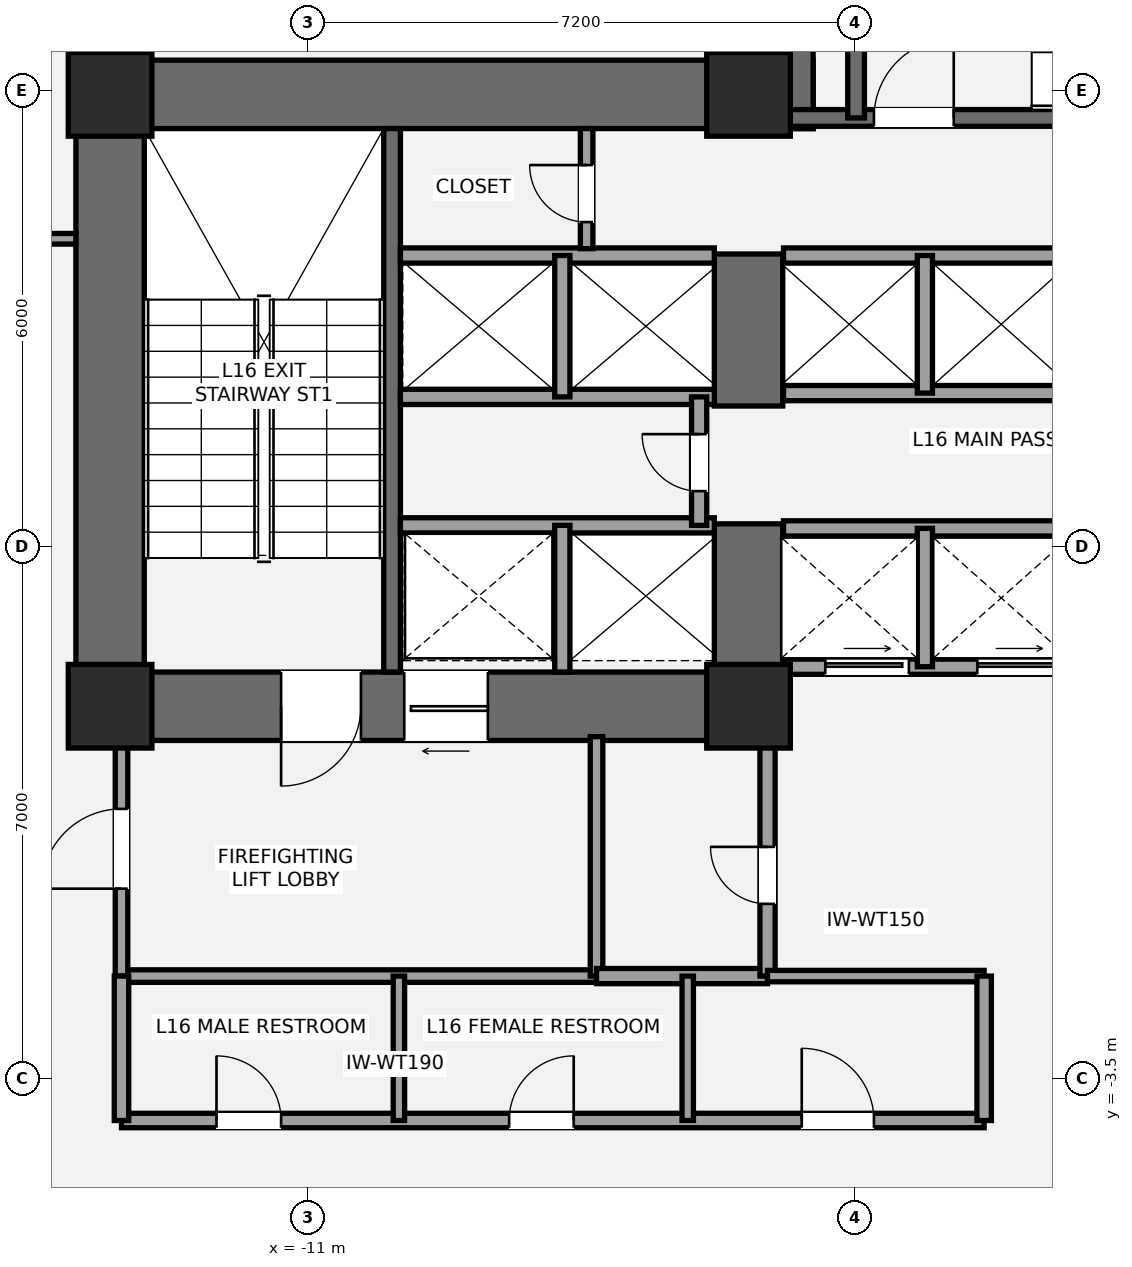
"""IFC4 building model, lengths in metres.
Left out: names, types, materials, properties, quantities, classifications, styles, units other than length and angle.
Written with IfcOpenShell. Run it as: python <this file> out.ifc"""

import sys

from ifc_helpers import new_model, si_unit, direction, frame, frame_2d, origin, origin_2d, place, context, subcontext, project, spatial, rectangle, extrude, element, fill, save


model = new_model("IFC4")
c1 = context("Model", 3, precision=1e-05, world=origin(), true_north=direction((0.0, 1.0)))
c2 = subcontext(c1, "Body", "Model", "MODEL_VIEW")
j1 = project(units=[si_unit("LENGTHUNIT", "METRE"), si_unit("PLANEANGLEUNIT", "RADIAN")], contexts=[c1])
p1 = place(None, origin())
s1 = spatial("IfcSite", under=j1, at=p1, CompositionType="ELEMENT")
p2 = place(p1, origin())
s2 = spatial("IfcBuilding", under=s1, at=p2, CompositionType="ELEMENT")
p3 = place(p2, frame((0.0, 0.0, 63.0)))
s3 = spatial("IfcBuildingStorey", under=s2, at=p3, CompositionType="ELEMENT", Elevation=63.0)
p4 = place(p3, frame((-13.6, 0.95, 0.0), z_axis=(0.0, 0.0, 1.0), x_axis=(0.0, 1.0, 0.0)))
e1 = element("IfcWall", 1, at=p4, inside=s3, PredefinedType="SHEAR", context=c2, shape_type="SweptSolid", body=[
    extrude(rectangle(XDim=8.95, YDim=0.9, at=frame_2d((4.475, 0.0))), origin(), (0.0, 0.0, 1.0), 3.6),
])
p5 = place(p3, frame((-14.05, 9.45, 0.0), z_axis=(0.0, 0.0, 1.0), x_axis=(1.0, 0.0, 0.0)))
e2 = element("IfcWall", 2, at=p5, inside=s3, PredefinedType="SHEAR", context=c2, shape_type="SweptSolid", body=[
    extrude(rectangle(XDim=9.7, YDim=0.9, at=frame_2d((4.85, 0.0))), origin(), (0.0, 0.0, 1.0), 3.6),
])
p6 = place(p3, frame((-4.75, 1.4, 0.0), z_axis=(0.0, 0.0, 1.0), x_axis=(-1.0, 0.0, 0.0)))
e3 = element("IfcWall", 3, at=p6, inside=s3, PredefinedType="SHEAR", context=c2, shape_type="SweptSolid", body=[
    extrude(rectangle(XDim=9.3, YDim=0.9, at=frame_2d((4.65, 0.0))), origin(), (0.0, 0.0, 1.0), 3.6),
])
p7 = place(p6, frame((5.55, 0.0, 0.0)))
e4 = element("IfcOpeningElement", 4, at=p7, cuts=e3, PredefinedType="OPENING", context=c2, shape_type="SweptSolid", body=[
    extrude(rectangle(XDim=1.05, YDim=2.15, at=frame_2d((0.525, 1.075))), frame((0.0, 0.46, 0.0), z_axis=(0.0, -1.0, 0.0), x_axis=(1.0, 0.0, 0.0)), (0.0, 0.0, 1.0), 0.92),
])
p8 = place(p6, frame((3.88, 0.0, 0.0)))
e5 = element("IfcOpeningElement", 5, at=p8, cuts=e3, PredefinedType="OPENING", context=c2, shape_type="SweptSolid", body=[
    extrude(rectangle(XDim=1.1, YDim=2.2, at=frame_2d((0.55, 1.1))), frame((0.0, 0.46, 0.0), z_axis=(0.0, -1.0, 0.0), x_axis=(1.0, 0.0, 0.0)), (0.0, 0.0, 1.0), 0.92),
])
p9 = place(p3, frame((-5.2, 0.95, 0.0), z_axis=(0.0, 0.0, 1.0), x_axis=(0.0, 1.0, 0.0)))
e6 = element("IfcWall", 6, at=p9, inside=s3, PredefinedType="SHEAR", context=c2, shape_type="SweptSolid", body=[
    extrude(rectangle(XDim=2.85, YDim=0.9, at=frame_2d((1.425, 0.0))), origin(), (0.0, 0.0, 1.0), 3.6),
])
p10 = place(p3, frame((-5.2, 5.35, 0.0), z_axis=(0.0, 0.0, 1.0), x_axis=(0.0, 1.0, 0.0)))
e7 = element("IfcWall", 7, at=p10, inside=s3, PredefinedType="SHEAR", context=c2, shape_type="SweptSolid", body=[
    extrude(rectangle(XDim=2.0, YDim=0.9, at=frame_2d((1.0, 0.0))), origin(), (0.0, 0.0, 1.0), 3.6),
])
p11 = place(p3, frame((-9.89, 1.85, 0.0), z_axis=(0.0, 0.0, 1.0), x_axis=(0.0, 1.0, 0.0)))
e8 = element("IfcWall", 8, at=p11, inside=s3, PredefinedType="SHEAR", context=c2, shape_type="SweptSolid", body=[
    extrude(rectangle(XDim=7.15, YDim=0.22, at=frame_2d((3.575, 0.0))), origin(), (0.0, 0.0, 1.0), 3.6),
])
p12 = place(p3, frame((-4.8, 9.0, 0.0), z_axis=(0.0, 0.0, 1.0), x_axis=(0.0, 1.0, 0.0)))
e9 = element("IfcWall", 9, at=p12, inside=s3, PredefinedType="SHEAR", context=c2, shape_type="SweptSolid", body=[
    extrude(rectangle(XDim=4.3, YDim=0.9, at=frame_2d((2.15, 0.0))), origin(), (0.0, 0.0, 1.0), 3.6),
])
p13 = place(p3, frame((-4.7, 9.14, 0.0), z_axis=(0.0, 0.0, 1.0), x_axis=(1.0, 0.0, 0.0)))
e10 = element("IfcWall", 10, at=p13, inside=s3, PredefinedType="SHEAR", context=c2, shape_type="SweptSolid", body=[
    extrude(rectangle(XDim=9.3, YDim=0.22, at=frame_2d((4.65, 0.0))), origin(), (0.0, 0.0, 1.0), 3.6),
])
p14 = place(p13, frame((1.15, 0.0, 0.0)))
e11 = element("IfcOpeningElement", 11, at=p14, cuts=e10, PredefinedType="OPENING", context=c2, shape_type="SweptSolid", body=[
    extrude(rectangle(XDim=1.05, YDim=2.15, at=frame_2d((0.525, 1.075))), frame((0.0, 0.12, 0.0), z_axis=(0.0, -1.0, 0.0), x_axis=(1.0, 0.0, 0.0)), (0.0, 0.0, 1.0), 0.24),
])
p15 = place(p3, frame((-3.785, 9.14, 0.0), z_axis=(0.0, 0.0, 1.0), x_axis=(0.0, 1.0, 0.0)))
e12 = element("IfcWall", 12, at=p15, inside=s3, PredefinedType="SHEAR", context=c2, shape_type="SweptSolid", body=[
    extrude(rectangle(XDim=3.26, YDim=0.22, at=frame_2d((1.63, 0.0))), origin(), (0.0, 0.0, 1.0), 3.6),
])
for number, where, z_axis, x_axis in (
    (13, (-13.6, 1.4, 0.0), (0.0, 0.0, 1.0), (1.0, 0.0, 0.0)),
    (14, (-13.6, 9.45, 0.0), (0.0, 0.0, 1.0), (1.0, 0.0, 0.0)),
    (15, (-5.2, 1.4, 0.0), (0.0, 0.0, 1.0), (1.0, 0.0, 0.0)),
    (16, (-5.2, 9.45, 0.0), (0.0, 0.0, 1.0), (1.0, 0.0, 0.0)),
):
    element("IfcColumn", number, at=place(p3, frame(where, z_axis=z_axis, x_axis=x_axis)), inside=s3, PredefinedType="COLUMN", context=c2, shape_type="SweptSolid", body=[
        extrude(rectangle(XDim=1.1, YDim=1.1, at=origin_2d()), origin(), (0.0, 0.0, 1.0), 3.6),
    ])
p16 = place(p3, frame((-13.45, -2.15, 0.0), z_axis=(0.0, 0.0, 1.0), x_axis=(1.0, 0.0, 0.0)))
e17 = element("IfcWall", 17, at=p16, inside=s3, PredefinedType="PARTITIONING", context=c2, shape_type="SweptSolid", body=[
    extrude(rectangle(XDim=6.25, YDim=0.165, at=frame_2d((3.125, 0.0))), origin(), (0.0, 0.0, 1.0), 3.4),
])
p17 = place(p3, frame((-13.45, -2.15, 0.0), z_axis=(0.0, 0.0, 1.0), x_axis=(0.0, 1.0, 0.0)))
e18 = element("IfcWall", 18, at=p17, inside=s3, PredefinedType="PARTITIONING", context=c2, shape_type="SweptSolid", body=[
    extrude(rectangle(XDim=3.15, YDim=0.165, at=frame_2d((1.575, 0.0))), origin(), (0.0, 0.0, 1.0), 2.853),
])
p18 = place(p17, frame((1.15, 0.0, 0.0)))
e19 = element("IfcOpeningElement", 19, at=p18, cuts=e18, PredefinedType="OPENING", context=c2, shape_type="SweptSolid", body=[
    extrude(rectangle(XDim=1.05, YDim=2.15, at=frame_2d((0.525, 1.075))), frame((0.0, 0.093, 0.0), z_axis=(0.0, -1.0, 0.0), x_axis=(1.0, 0.0, 0.0)), (0.0, 0.0, 1.0), 0.185),
])
p19 = place(p3, frame((-7.2, -2.15, 0.0), z_axis=(0.0, 0.0, 1.0), x_axis=(0.0, 1.0, 0.0)))
e20 = element("IfcWall", 20, at=p19, inside=s3, PredefinedType="PARTITIONING", context=c2, shape_type="SweptSolid", body=[
    extrude(rectangle(XDim=3.15, YDim=0.165, at=frame_2d((1.575, 0.0))), origin(), (0.0, 0.0, 1.0), 2.853),
])
p20 = place(p3, frame((-7.2, -2.15, 0.0), z_axis=(0.0, 0.0, 1.0), x_axis=(1.0, 0.0, 0.0)))
e21 = element("IfcWall", 21, at=p20, inside=s3, PredefinedType="SOLIDWALL", context=c2, shape_type="SweptSolid", body=[
    extrude(rectangle(XDim=2.25, YDim=0.2, at=frame_2d((1.125, 0.0))), origin(), (0.0, 0.0, 1.0), 3.4),
])
p21 = place(p3, frame((-4.95, -2.15, 0.0), z_axis=(0.0, 0.0, 1.0), x_axis=(0.0, 1.0, 0.0)))
e22 = element("IfcWall", 22, at=p21, inside=s3, PredefinedType="SOLIDWALL", context=c2, shape_type="SweptSolid", body=[
    extrude(rectangle(XDim=3.15, YDim=0.2, at=frame_2d((1.575, 0.0))), origin(), (0.0, 0.0, 1.0), 2.853),
])
p22 = place(p21, frame((0.95, 0.0, 0.0)))
e23 = element("IfcOpeningElement", 23, at=p22, cuts=e22, PredefinedType="OPENING", context=c2, shape_type="SweptSolid", body=[
    extrude(rectangle(XDim=0.75, YDim=2.1, at=frame_2d((0.375, 1.05))), frame((0.0, 0.11, 0.0), z_axis=(0.0, -1.0, 0.0), x_axis=(1.0, 0.0, 0.0)), (0.0, 0.0, 1.0), 0.22),
])
p23 = place(p3, frame((-9.78, 3.78, 0.0), z_axis=(0.0, 0.0, 1.0), x_axis=(1.0, 0.0, 0.0)))
e24 = element("IfcWall", 24, at=p23, inside=s3, PredefinedType="SOLIDWALL", context=c2, shape_type="SweptSolid", body=[
    extrude(rectangle(XDim=4.13, YDim=0.2, at=frame_2d((2.065, 0.0))), origin(), (0.0, 0.0, 1.0), 3.4),
])
p24 = place(p3, frame((-7.65, 1.85, 0.0), z_axis=(0.0, 0.0, 1.0), x_axis=(0.0, 1.0, 0.0)))
e25 = element("IfcWall", 25, at=p24, inside=s3, PredefinedType="SOLIDWALL", context=c2, shape_type="SweptSolid", body=[
    extrude(rectangle(XDim=1.93, YDim=0.2, at=frame_2d((0.965, 0.0))), origin(), (0.0, 0.0, 1.0), 3.4),
])
for number, where, z_axis, x_axis in (
    (26, (-9.78, 5.47, 0.0), (0.0, 0.0, 1.0), (1.0, 0.0, 0.0)),
    (27, (-9.78, 7.33, 0.0), (0.0, 0.0, 1.0), (1.0, 0.0, 0.0)),
):
    element("IfcWall", number, at=place(p3, frame(where, z_axis=z_axis, x_axis=x_axis)), inside=s3, PredefinedType="SOLIDWALL", context=c2, shape_type="SweptSolid", body=[
        extrude(rectangle(XDim=4.13, YDim=0.2, at=frame_2d((2.065, 0.0))), origin(), (0.0, 0.0, 1.0), 3.4),
    ])
p25 = place(p3, frame((-7.65, 5.47, 0.0), z_axis=(0.0, 0.0, 1.0), x_axis=(0.0, 1.0, 0.0)))
e28 = element("IfcWall", 28, at=p25, inside=s3, PredefinedType="SOLIDWALL", context=c2, shape_type="SweptSolid", body=[
    extrude(rectangle(XDim=1.86, YDim=0.2, at=frame_2d((0.93, 0.0))), origin(), (0.0, 0.0, 1.0), 3.4),
])
p26 = place(p3, frame((-5.85, 3.78, 0.0), z_axis=(0.0, 0.0, 1.0), x_axis=(0.0, 1.0, 0.0)))
e29 = element("IfcWall", 29, at=p26, inside=s3, PredefinedType="SOLIDWALL", context=c2, shape_type="SweptSolid", body=[
    extrude(rectangle(XDim=1.69, YDim=0.2, at=frame_2d((0.845, 0.0))), origin(), (0.0, 0.0, 1.0), 3.4),
])
p27 = place(p26, frame((0.45, 0.0, 0.0)))
e30 = element("IfcOpeningElement", 30, at=p27, cuts=e29, PredefinedType="OPENING", context=c2, shape_type="SweptSolid", body=[
    extrude(rectangle(XDim=0.75, YDim=2.1, at=frame_2d((0.375, 1.05))), frame((0.0, 0.11, 0.0), z_axis=(0.0, -1.0, 0.0), x_axis=(1.0, 0.0, 0.0)), (0.0, 0.0, 1.0), 0.22),
])
p28 = place(p3, frame((-4.74, 1.92, 0.0), z_axis=(0.0, 0.0, 1.0), x_axis=(1.0, 0.0, 0.0)))
e31 = element("IfcWall", 31, at=p28, inside=s3, PredefinedType="SOLIDWALL", context=c2, shape_type="SweptSolid", body=[
    extrude(rectangle(XDim=3.86, YDim=0.2, at=frame_2d((1.93, 0.0))), origin(), (0.0, 0.0, 1.0), 2.39),
])
p29 = place(p28, frame((0.55, 0.0, 0.0)))
e32 = element("IfcOpeningElement", 32, at=p29, cuts=e31, PredefinedType="OPENING", context=c2, shape_type="SweptSolid", body=[
    extrude(rectangle(XDim=1.1, YDim=2.2, at=frame_2d((0.55, 1.1))), frame((0.0, 0.11, 0.0), z_axis=(0.0, -1.0, 0.0), x_axis=(1.0, 0.0, 0.0)), (0.0, 0.0, 1.0), 0.22),
])
p30 = place(p28, frame((2.55, 0.0, 0.0)))
e33 = element("IfcOpeningElement", 33, at=p30, cuts=e31, PredefinedType="OPENING", context=c2, shape_type="SweptSolid", body=[
    extrude(rectangle(XDim=1.1, YDim=2.2, at=frame_2d((0.55, 1.1))), frame((0.0, 0.11, 0.0), z_axis=(0.0, -1.0, 0.0), x_axis=(1.0, 0.0, 0.0)), (0.0, 0.0, 1.0), 0.22),
])
p31 = place(p3, frame((-4.74, 3.74, 0.0), z_axis=(0.0, 0.0, 1.0), x_axis=(1.0, 0.0, 0.0)))
e34 = element("IfcWall", 34, at=p31, inside=s3, PredefinedType="SOLIDWALL", context=c2, shape_type="SweptSolid", body=[
    extrude(rectangle(XDim=3.86, YDim=0.2, at=frame_2d((1.93, 0.0))), origin(), (0.0, 0.0, 1.0), 3.4),
])
p32 = place(p3, frame((-2.88, 1.92, 0.0), z_axis=(0.0, 0.0, 1.0), x_axis=(0.0, 1.0, 0.0)))
e35 = element("IfcWall", 35, at=p32, inside=s3, PredefinedType="SOLIDWALL", context=c2, shape_type="SweptSolid", body=[
    extrude(rectangle(XDim=1.82, YDim=0.2, at=frame_2d((0.91, 0.0))), origin(), (0.0, 0.0, 1.0), 3.4),
])
for number, where, z_axis, x_axis in (
    (36, (-4.74, 5.52, 0.0), (0.0, 0.0, 1.0), (1.0, 0.0, 0.0)),
    (37, (-4.74, 7.33, 0.0), (0.0, 0.0, 1.0), (1.0, 0.0, 0.0)),
):
    element("IfcWall", number, at=place(p3, frame(where, z_axis=z_axis, x_axis=x_axis)), inside=s3, PredefinedType="SOLIDWALL", context=c2, shape_type="SweptSolid", body=[
        extrude(rectangle(XDim=3.86, YDim=0.2, at=frame_2d((1.93, 0.0))), origin(), (0.0, 0.0, 1.0), 3.4),
    ])
p33 = place(p3, frame((-2.88, 5.52, 0.0), z_axis=(0.0, 0.0, 1.0), x_axis=(0.0, 1.0, 0.0)))
e38 = element("IfcWall", 38, at=p33, inside=s3, PredefinedType="SOLIDWALL", context=c2, shape_type="SweptSolid", body=[
    extrude(rectangle(XDim=1.81, YDim=0.2, at=frame_2d((0.905, 0.0))), origin(), (0.0, 0.0, 1.0), 3.4),
])
p34 = place(p3, frame((-7.33, 7.42, 0.0), z_axis=(0.0, 0.0, 1.0), x_axis=(0.0, 1.0, 0.0)))
e39 = element("IfcWall", 39, at=p34, inside=s3, PredefinedType="PARTITIONING", context=c2, shape_type="SweptSolid", body=[
    extrude(rectangle(XDim=1.58, YDim=0.165, at=frame_2d((0.79, 0.0))), origin(), (0.0, 0.0, 1.0), 3.4),
])
p35 = place(p34, frame((0.35, 0.0, 0.0)))
e40 = element("IfcOpeningElement", 40, at=p35, cuts=e39, PredefinedType="OPENING", context=c2, shape_type="SweptSolid", body=[
    extrude(rectangle(XDim=0.75, YDim=2.1, at=frame_2d((0.375, 1.05))), frame((0.0, 0.093, 0.0), z_axis=(0.0, -1.0, 0.0), x_axis=(1.0, 0.0, 0.0)), (0.0, 0.0, 1.0), 0.185),
])
p36 = place(p3, frame((-13.45, -4.05, 0.0), z_axis=(0.0, 0.0, 1.0), x_axis=(1.0, 0.0, 0.0)))
e41 = element("IfcWall", 41, at=p36, inside=s3, PredefinedType="PLUMBINGWALL", context=c2, shape_type="SweptSolid", body=[
    extrude(rectangle(XDim=11.35, YDim=0.19, at=frame_2d((5.675, 0.0))), origin(), (0.0, 0.0, 1.0), 2.933),
])
p37 = place(p36, frame((1.25, 0.0, 0.0)))
e42 = element("IfcOpeningElement", 42, at=p37, cuts=e41, PredefinedType="OPENING", context=c2, shape_type="SweptSolid", body=[
    extrude(rectangle(XDim=0.85, YDim=2.1, at=frame_2d((0.425, 1.05))), frame((0.0, 0.105, 0.0), z_axis=(0.0, -1.0, 0.0), x_axis=(1.0, 0.0, 0.0)), (0.0, 0.0, 1.0), 0.21),
])
p38 = place(p36, frame((5.1, 0.0, 0.0)))
e43 = element("IfcOpeningElement", 43, at=p38, cuts=e41, PredefinedType="OPENING", context=c2, shape_type="SweptSolid", body=[
    extrude(rectangle(XDim=0.85, YDim=2.1, at=frame_2d((0.425, 1.05))), frame((0.0, 0.105, 0.0), z_axis=(0.0, -1.0, 0.0), x_axis=(1.0, 0.0, 0.0)), (0.0, 0.0, 1.0), 0.21),
])
p39 = place(p36, frame((8.95, 0.0, 0.0)))
e44 = element("IfcOpeningElement", 44, at=p39, cuts=e41, PredefinedType="OPENING", context=c2, shape_type="SweptSolid", body=[
    extrude(rectangle(XDim=0.95, YDim=2.15, at=frame_2d((0.475, 1.075))), frame((0.0, 0.105, 0.0), z_axis=(0.0, -1.0, 0.0), x_axis=(1.0, 0.0, 0.0)), (0.0, 0.0, 1.0), 0.21),
])
p40 = place(p3, frame((-4.95, -2.15, 0.0), z_axis=(0.0, 0.0, 1.0), x_axis=(1.0, 0.0, 0.0)))
e45 = element("IfcWall", 45, at=p40, inside=s3, PredefinedType="PLUMBINGWALL", context=c2, shape_type="SweptSolid", body=[
    extrude(rectangle(XDim=2.85, YDim=0.15, at=frame_2d((1.425, 0.0))), origin(), (0.0, 0.0, 1.0), 3.4),
])
p41 = place(p3, frame((-13.45, -4.05, 0.0), z_axis=(0.0, 0.0, 1.0), x_axis=(0.0, 1.0, 0.0)))
e46 = element("IfcWall", 46, at=p41, inside=s3, PredefinedType="PLUMBINGWALL", context=c2, shape_type="SweptSolid", body=[
    extrude(rectangle(XDim=1.9, YDim=0.19, at=frame_2d((0.95, 0.0))), origin(), (0.0, 0.0, 1.0), 2.853),
])
p42 = place(p3, frame((-2.1, -4.05, 0.0), z_axis=(0.0, 0.0, 1.0), x_axis=(0.0, 1.0, 0.0)))
e47 = element("IfcWall", 47, at=p42, inside=s3, PredefinedType="PLUMBINGWALL", context=c2, shape_type="SweptSolid", body=[
    extrude(rectangle(XDim=1.9, YDim=0.19, at=frame_2d((0.95, 0.0))), origin(), (0.0, 0.0, 1.0), 3.4),
])
p43 = place(p3, frame((-9.8, -4.05, 0.0), z_axis=(0.0, 0.0, 1.0), x_axis=(0.0, 1.0, 0.0)))
e48 = element("IfcWall", 48, at=p43, inside=s3, PredefinedType="PLUMBINGWALL", context=c2, shape_type="SweptSolid", body=[
    extrude(rectangle(XDim=1.9, YDim=0.15, at=frame_2d((0.95, 0.0))), origin(), (0.0, 0.0, 1.0), 3.4),
])
p44 = place(p3, frame((-6.0, -4.05, 0.0), z_axis=(0.0, 0.0, 1.0), x_axis=(0.0, 1.0, 0.0)))
e49 = element("IfcWall", 49, at=p44, inside=s3, PredefinedType="PLUMBINGWALL", context=c2, shape_type="SweptSolid", body=[
    extrude(rectangle(XDim=1.9, YDim=0.15, at=frame_2d((0.95, 0.0))), origin(), (0.0, 0.0, 1.0), 2.841),
])
p45 = place(p3, frame((-26.052, 7.55, 0.0), z_axis=(0.0, 0.0, 1.0), x_axis=(1.0, 0.0, 0.0)))
e50 = element("IfcWall", 50, at=p45, inside=s3, PredefinedType="PARTITIONING", context=c2, shape_type="SweptSolid", body=[
    extrude(rectangle(XDim=12.002, YDim=0.14, at=frame_2d((6.001, 0.0))), origin(), (0.0, 0.0, 1.0), 2.853),
])
p46 = place(p45, frame((1.871, 0.0, 0.0)))
e51 = element("IfcOpeningElement", 51, at=p46, cuts=e50, PredefinedType="OPENING", context=c2, shape_type="SweptSolid", body=[
    extrude(rectangle(XDim=0.92, YDim=2.15, at=frame_2d((0.46, 1.075))), frame((0.0, 0.08, 0.0), z_axis=(0.0, -1.0, 0.0), x_axis=(1.0, 0.0, 0.0)), (0.0, 0.0, 1.0), 0.16),
])
p47 = place(p7, origin())
e52 = element("IfcDoor", 52, at=p47, inside=s3, OperationType="SINGLE_SWING_RIGHT", PredefinedType="DOOR", context=c2, shape_type="SweptSolid", body=[
    extrude(rectangle(XDim=1.05, YDim=2.15, at=frame_2d((0.525, 1.075))), frame((0.0, 0.025, 0.0), z_axis=(0.0, -1.0, 0.0), x_axis=(1.0, 0.0, 0.0)), (0.0, 0.0, 1.0), 0.05),
])
fill(e4, e52)
p48 = place(p14, origin())
e53 = element("IfcDoor", 53, at=p48, inside=s3, OperationType="SINGLE_SWING_RIGHT", PredefinedType="DOOR", context=c2, shape_type="SweptSolid", body=[
    extrude(rectangle(XDim=1.05, YDim=2.15, at=frame_2d((0.525, 1.075))), frame((0.0, 0.025, 0.0), z_axis=(0.0, -1.0, 0.0), x_axis=(1.0, 0.0, 0.0)), (0.0, 0.0, 1.0), 0.05),
])
fill(e11, e53)
p49 = place(p18, origin())
e54 = element("IfcDoor", 54, at=p49, inside=s3, OperationType="SINGLE_SWING_LEFT", PredefinedType="DOOR", context=c2, shape_type="SweptSolid", body=[
    extrude(rectangle(XDim=1.05, YDim=2.15, at=frame_2d((0.525, 1.075))), frame((0.0, 0.025, 0.0), z_axis=(0.0, -1.0, 0.0), x_axis=(1.0, 0.0, 0.0)), (0.0, 0.0, 1.0), 0.05),
])
fill(e19, e54)
p50 = place(p22, origin())
e55 = element("IfcDoor", 55, at=p50, inside=s3, OperationType="SINGLE_SWING_RIGHT", PredefinedType="DOOR", context=c2, shape_type="SweptSolid", body=[
    extrude(rectangle(XDim=0.75, YDim=2.1, at=frame_2d((0.375, 1.05))), frame((0.0, 0.025, 0.0), z_axis=(0.0, -1.0, 0.0), x_axis=(1.0, 0.0, 0.0)), (0.0, 0.0, 1.0), 0.05),
])
fill(e23, e55)
p51 = place(p8, origin())
e56 = element("IfcDoor", 56, at=p51, inside=s3, OperationType="SLIDING_TO_LEFT", PredefinedType="DOOR", context=c2, shape_type="SweptSolid", body=[
    extrude(rectangle(XDim=1.1, YDim=2.2, at=frame_2d((0.55, 1.1))), frame((0.0, 0.025, 0.0), z_axis=(0.0, -1.0, 0.0), x_axis=(1.0, 0.0, 0.0)), (0.0, 0.0, 1.0), 0.05),
])
fill(e5, e56)
p52 = place(p27, origin())
e57 = element("IfcDoor", 57, at=p52, inside=s3, OperationType="SINGLE_SWING_RIGHT", PredefinedType="DOOR", context=c2, shape_type="SweptSolid", body=[
    extrude(rectangle(XDim=0.75, YDim=2.1, at=frame_2d((0.375, 1.05))), frame((0.0, 0.025, 0.0), z_axis=(0.0, -1.0, 0.0), x_axis=(1.0, 0.0, 0.0)), (0.0, 0.0, 1.0), 0.05),
])
fill(e30, e57)
p53 = place(p29, origin())
e58 = element("IfcDoor", 58, at=p53, inside=s3, OperationType="SLIDING_TO_LEFT", PredefinedType="DOOR", context=c2, shape_type="SweptSolid", body=[
    extrude(rectangle(XDim=1.1, YDim=2.2, at=frame_2d((0.55, 1.1))), frame((0.0, 0.025, 0.0), z_axis=(0.0, -1.0, 0.0), x_axis=(1.0, 0.0, 0.0)), (0.0, 0.0, 1.0), 0.05),
])
fill(e32, e58)
p54 = place(p30, origin())
e59 = element("IfcDoor", 59, at=p54, inside=s3, OperationType="SLIDING_TO_LEFT", PredefinedType="DOOR", context=c2, shape_type="SweptSolid", body=[
    extrude(rectangle(XDim=1.1, YDim=2.2, at=frame_2d((0.55, 1.1))), frame((0.0, 0.025, 0.0), z_axis=(0.0, -1.0, 0.0), x_axis=(1.0, 0.0, 0.0)), (0.0, 0.0, 1.0), 0.05),
])
fill(e33, e59)
p55 = place(p35, origin())
e60 = element("IfcDoor", 60, at=p55, inside=s3, OperationType="SINGLE_SWING_RIGHT", PredefinedType="DOOR", context=c2, shape_type="SweptSolid", body=[
    extrude(rectangle(XDim=0.75, YDim=2.1, at=frame_2d((0.375, 1.05))), frame((0.0, 0.025, 0.0), z_axis=(0.0, -1.0, 0.0), x_axis=(1.0, 0.0, 0.0)), (0.0, 0.0, 1.0), 0.05),
])
fill(e40, e60)
p56 = place(p37, origin())
e61 = element("IfcDoor", 61, at=p56, inside=s3, OperationType="SINGLE_SWING_LEFT", PredefinedType="DOOR", context=c2, shape_type="SweptSolid", body=[
    extrude(rectangle(XDim=0.85, YDim=2.1, at=frame_2d((0.425, 1.05))), frame((0.0, 0.025, 0.0), z_axis=(0.0, -1.0, 0.0), x_axis=(1.0, 0.0, 0.0)), (0.0, 0.0, 1.0), 0.05),
])
fill(e42, e61)
p57 = place(p38, origin())
e62 = element("IfcDoor", 62, at=p57, inside=s3, OperationType="SINGLE_SWING_RIGHT", PredefinedType="DOOR", context=c2, shape_type="SweptSolid", body=[
    extrude(rectangle(XDim=0.85, YDim=2.1, at=frame_2d((0.425, 1.05))), frame((0.0, 0.025, 0.0), z_axis=(0.0, -1.0, 0.0), x_axis=(1.0, 0.0, 0.0)), (0.0, 0.0, 1.0), 0.05),
])
fill(e43, e62)
p58 = place(p39, origin())
e63 = element("IfcDoor", 63, at=p58, inside=s3, OperationType="SINGLE_SWING_LEFT", PredefinedType="DOOR", context=c2, shape_type="SweptSolid", body=[
    extrude(rectangle(XDim=0.95, YDim=2.15, at=frame_2d((0.475, 1.075))), frame((0.0, 0.025, 0.0), z_axis=(0.0, -1.0, 0.0), x_axis=(1.0, 0.0, 0.0)), (0.0, 0.0, 1.0), 0.05),
])
fill(e44, e63)
save(model, sys.argv[1])
